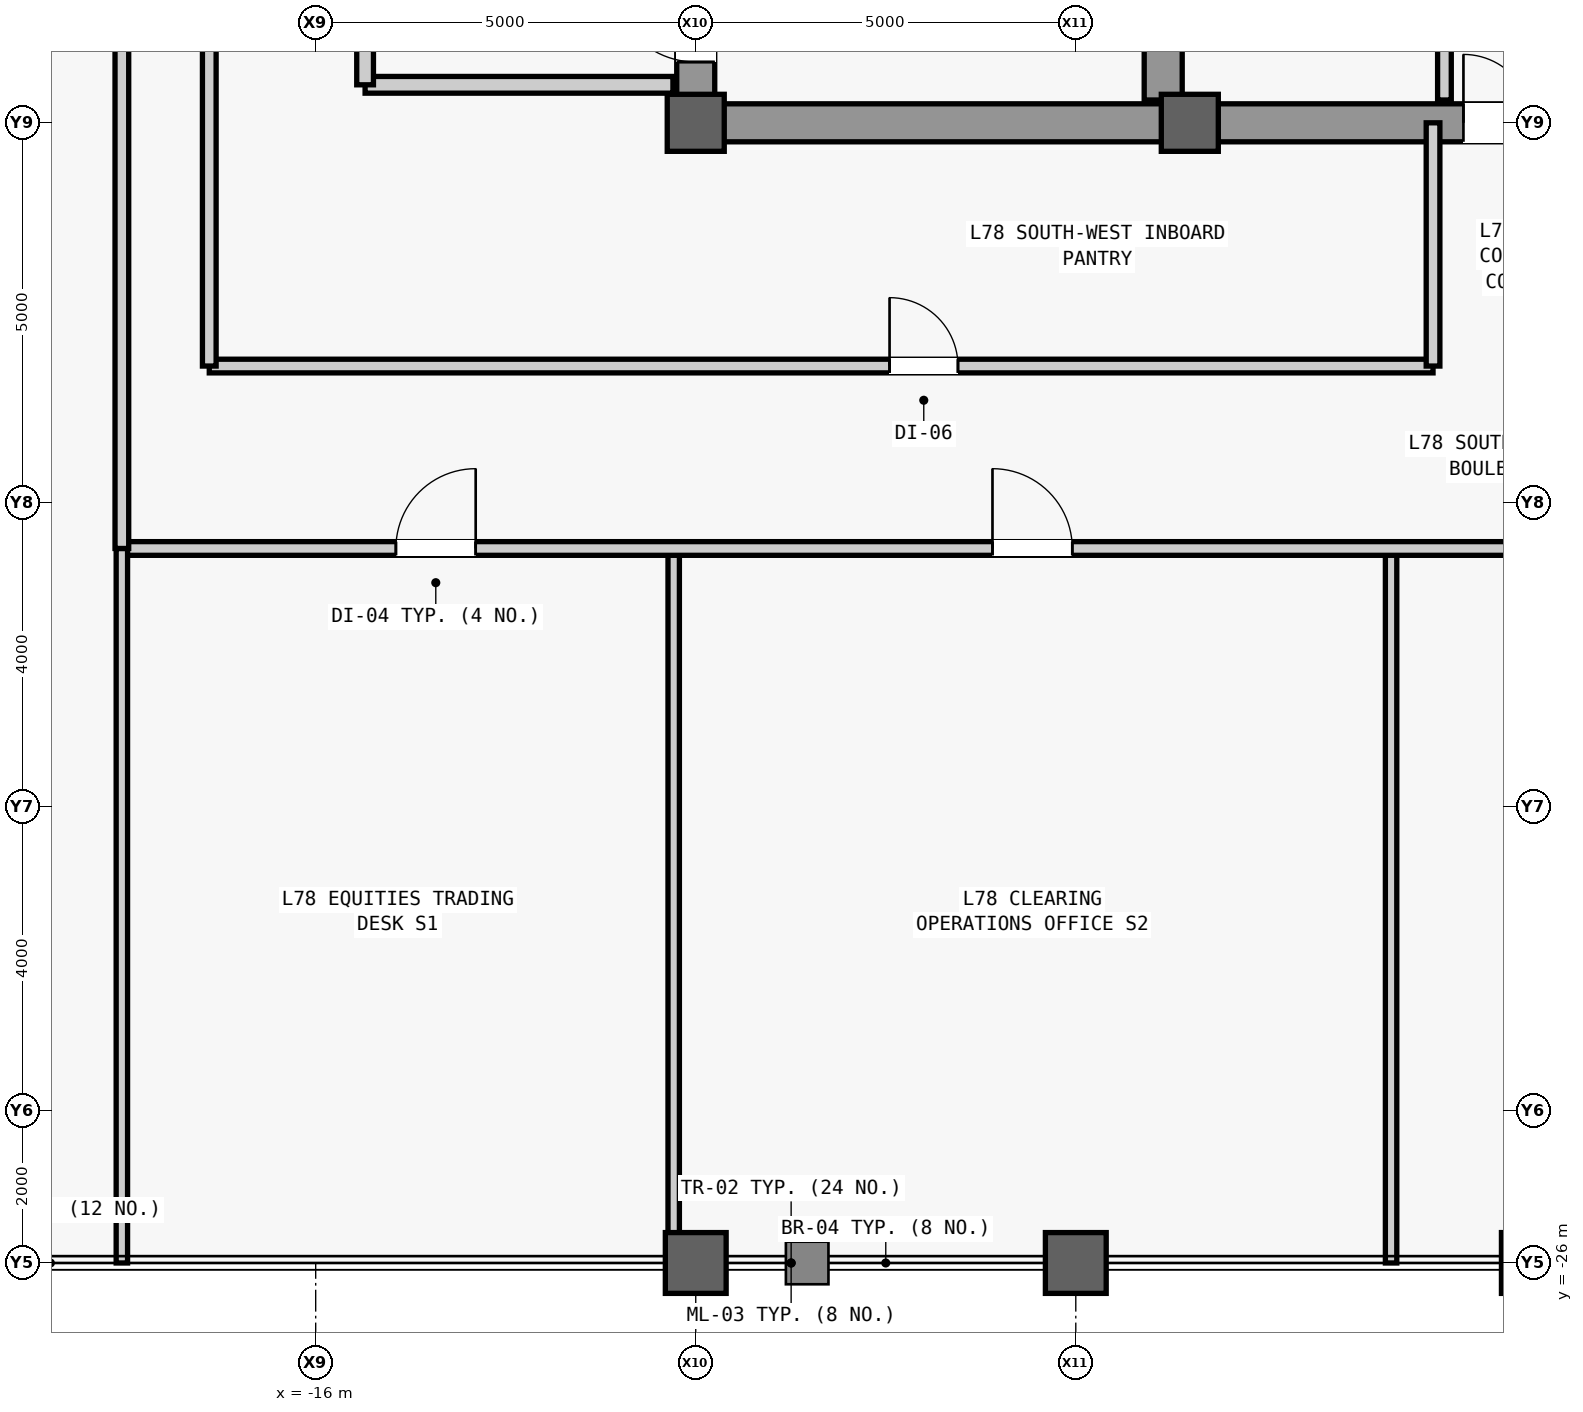
"""IFC4 building model, lengths in metres.
Left out: names, types, materials, properties, quantities, classifications, styles, units other than length and angle.
Written with IfcOpenShell. Run it as: python <this file> out.ifc"""

import sys

from ifc_helpers import new_model, si_unit, direction, frame, frame_2d, origin, origin_2d, place, context, subcontext, project, spatial, rectangle, hollow_rectangle, extrude, source, transform, mapped, element, fill, save


model = new_model("IFC4")
c1 = context("Model", 3, precision=1e-05, world=origin(), true_north=direction((0.0, 1.0)))
c2 = subcontext(c1, "Body", "Model", "MODEL_VIEW")
j1 = project(units=[si_unit("LENGTHUNIT", "METRE"), si_unit("PLANEANGLEUNIT", "RADIAN")], contexts=[c1])
p1 = place(None, origin())
s1 = spatial("IfcSite", under=j1, at=p1, CompositionType="ELEMENT")
p2 = place(p1, origin())
s2 = spatial("IfcBuilding", under=s1, at=p2, CompositionType="ELEMENT")
p3 = place(p2, frame((0.0, 0.0, 330.3)))
s3 = spatial("IfcBuildingStorey", under=s2, at=p3, CompositionType="ELEMENT", Elevation=330.3)
m1 = source(origin(), c2, "Body", "SweptSolid", [
    extrude(rectangle(XDim=22.0, YDim=0.5, at=frame_2d((11.0, 0.0))), origin(), (0.0, 0.0, 1.0), 3.74),
])
p4 = place(p3, frame((-11.0, -11.0, 0.0), z_axis=(0.0, 0.0, 1.0), x_axis=(0.0, 1.0, 0.0)))
e1 = element("IfcWall", 1, at=p4, inside=s3, PredefinedType="SHEAR", context=c2, shape_type="MappedRepresentation", body=[
    mapped(m1, transform((0.0, 0.0, 0.0), scale=1.0)),
])
m2 = source(origin(), c2, "Body", "SweptSolid", [
    extrude(rectangle(XDim=1.1, YDim=2.2, at=frame_2d((0.55, 1.1))), frame((0.0, 0.26, 0.0), z_axis=(0.0, -1.0, 0.0), x_axis=(1.0, 0.0, 0.0)), (0.0, 0.0, 1.0), 0.52),
])
p5 = place(p4, frame((0.8, 0.0, 0.0)))
e2 = element("IfcOpeningElement", 2, at=p5, cuts=e1, PredefinedType="OPENING", context=c2, shape_type="MappedRepresentation", body=[
    mapped(m2, transform((0.0, 0.0, 0.0), scale=1.0)),
])
p6 = place(p4, frame((12.5, 0.0, 0.0)))
e3 = element("IfcOpeningElement", 3, at=p6, cuts=e1, PredefinedType="OPENING", context=c2, shape_type="MappedRepresentation", body=[
    mapped(m2, transform((0.0, 0.0, 0.0), scale=1.0)),
])
m3 = source(origin(), c2, "Body", "SweptSolid", [
    extrude(rectangle(XDim=0.9, YDim=2.15, at=frame_2d((0.45, 1.075))), frame((0.0, 0.26, 0.0), z_axis=(0.0, -1.0, 0.0), x_axis=(1.0, 0.0, 0.0)), (0.0, 0.0, 1.0), 0.52),
])
p7 = place(p4, frame((6.85, 0.0, 0.0)))
e4 = element("IfcOpeningElement", 4, at=p7, cuts=e1, PredefinedType="OPENING", context=c2, shape_type="MappedRepresentation", body=[
    mapped(m3, transform((0.0, 0.0, 0.0), scale=1.0)),
])
m4 = source(origin(), c2, "Body", "SweptSolid", [
    extrude(rectangle(XDim=1.2, YDim=2.3, at=frame_2d((0.6, 1.15))), frame((0.0, 0.26, 0.0), z_axis=(0.0, -1.0, 0.0), x_axis=(1.0, 0.0, 0.0)), (0.0, 0.0, 1.0), 0.52),
])
p8 = place(p4, frame((14.6, 0.0, 0.0)))
e5 = element("IfcOpeningElement", 5, at=p8, cuts=e1, PredefinedType="OPENING", context=c2, shape_type="MappedRepresentation", body=[
    mapped(m4, transform((0.0, 0.0, 0.0), scale=1.0)),
])
p9 = place(p4, frame((18.2, 0.0, 0.0)))
e6 = element("IfcOpeningElement", 6, at=p9, cuts=e1, PredefinedType="OPENING", context=c2, shape_type="MappedRepresentation", body=[
    mapped(m4, transform((0.0, 0.0, 0.0), scale=1.0)),
])
m5 = source(origin(), c2, "Body", "SweptSolid", [
    extrude(rectangle(XDim=1.3, YDim=2.3, at=frame_2d((0.65, 1.15))), frame((0.0, 0.26, 0.0), z_axis=(0.0, -1.0, 0.0), x_axis=(1.0, 0.0, 0.0)), (0.0, 0.0, 1.0), 0.52),
])
p10 = place(p4, frame((2.7, 0.0, 0.0)))
e7 = element("IfcOpeningElement", 7, at=p10, cuts=e1, PredefinedType="OPENING", context=c2, shape_type="MappedRepresentation", body=[
    mapped(m5, transform((0.0, 0.0, 0.0), scale=1.0)),
])
m6 = source(origin(), c2, "Body", "SweptSolid", [
    extrude(rectangle(XDim=21.4, YDim=0.5, at=frame_2d((10.7, 0.0))), origin(), (0.0, 0.0, 1.0), 3.74),
])
p11 = place(p3, frame((-4.85, -10.7, 0.0), z_axis=(0.0, 0.0, 1.0), x_axis=(0.0, 1.0, 0.0)))
e8 = element("IfcWall", 8, at=p11, inside=s3, PredefinedType="SHEAR", context=c2, shape_type="MappedRepresentation", body=[
    mapped(m6, transform((0.0, 0.0, 0.0), scale=1.0)),
])
m7 = source(origin(), c2, "Body", "SweptSolid", [
    extrude(rectangle(XDim=5.9, YDim=0.5, at=frame_2d((2.95, 0.0))), origin(), (0.0, 0.0, 1.0), 3.74),
])
p12 = place(p3, frame((-10.75, -11.0, 0.0), z_axis=(0.0, 0.0, 1.0), x_axis=(1.0, 0.0, 0.0)))
e9 = element("IfcWall", 9, at=p12, inside=s3, PredefinedType="SHEAR", context=c2, shape_type="MappedRepresentation", body=[
    mapped(m7, transform((0.0, 0.0, 0.0), scale=1.0)),
])
m8 = source(origin(), c2, "Body", "SweptSolid", [
    extrude(rectangle(XDim=9.2, YDim=0.5, at=frame_2d((4.6, 0.0))), origin(), (0.0, 0.0, 1.0), 3.74),
])
p13 = place(p3, frame((-4.6, -11.0, 0.0), z_axis=(0.0, 0.0, 1.0), x_axis=(1.0, 0.0, 0.0)))
e10 = element("IfcWall", 10, at=p13, inside=s3, PredefinedType="SHEAR", context=c2, shape_type="MappedRepresentation", body=[
    mapped(m8, transform((0.0, 0.0, 0.0), scale=1.0)),
])
m9 = source(origin(), c2, "Body", "SweptSolid", [
    extrude(rectangle(XDim=1.8, YDim=2.25, at=frame_2d((0.9, 1.125))), frame((0.0, 0.26, 0.0), z_axis=(0.0, -1.0, 0.0), x_axis=(1.0, 0.0, 0.0)), (0.0, 0.0, 1.0), 0.52),
])
p14 = place(p13, frame((3.7, 0.0, 0.0)))
e11 = element("IfcOpeningElement", 11, at=p14, cuts=e10, PredefinedType="OPENING", context=c2, shape_type="MappedRepresentation", body=[
    mapped(m9, transform((0.0, 0.0, 0.0), scale=1.0)),
])
m10 = source(origin(), c2, "Body", "SweptSolid", [
    extrude(hollow_rectangle(XDim=0.8, YDim=0.8, WallThickness=0.045, at=origin_2d()), origin(), (0.0, 0.0, 1.0), 4.0),
])
p15 = place(p3, frame((-11.0, -26.0, 0.0), z_axis=(0.0, 0.0, 1.0), x_axis=(1.0, 0.0, 0.0)))
e12 = element("IfcColumn", 12, at=p15, inside=s3, PredefinedType="COLUMN", context=c2, shape_type="MappedRepresentation", body=[
    mapped(m10, transform((0.0, 0.0, 0.0), scale=1.0)),
])
m11 = source(origin(), c2, "Body", "SweptSolid", [
    extrude(rectangle(XDim=0.75, YDim=0.75, at=origin_2d()), origin(), (0.0, 0.0, 1.0), 4.0),
])
p16 = place(p3, frame((-11.0, -11.0, 0.0), z_axis=(0.0, 0.0, 1.0), x_axis=(1.0, 0.0, 0.0)))
e13 = element("IfcColumn", 13, at=p16, inside=s3, PredefinedType="COLUMN", context=c2, shape_type="MappedRepresentation", body=[
    mapped(m11, transform((0.0, 0.0, 0.0), scale=1.0)),
])
p17 = place(p3, frame((-6.0, -26.0, 0.0), z_axis=(0.0, 0.0, 1.0), x_axis=(1.0, 0.0, 0.0)))
e14 = element("IfcColumn", 14, at=p17, inside=s3, PredefinedType="COLUMN", context=c2, shape_type="MappedRepresentation", body=[
    mapped(m10, transform((0.0, 0.0, 0.0), scale=1.0)),
])
p18 = place(p3, frame((-4.5, -11.0, 0.0), z_axis=(0.0, 0.0, 1.0), x_axis=(1.0, 0.0, 0.0)))
e15 = element("IfcColumn", 15, at=p18, inside=s3, PredefinedType="COLUMN", context=c2, shape_type="MappedRepresentation", body=[
    mapped(m11, transform((0.0, 0.0, 0.0), scale=1.0)),
])
p19 = place(p3, frame((0.0, -26.0, 0.0), z_axis=(0.0, 0.0, 1.0), x_axis=(1.0, 0.0, 0.0)))
e16 = element("IfcColumn", 16, at=p19, inside=s3, PredefinedType="COLUMN", context=c2, shape_type="MappedRepresentation", body=[
    mapped(m10, transform((0.0, 0.0, 0.0), scale=1.0)),
])
m12 = source(origin(), c2, "Body", "SweptSolid", [
    extrude(rectangle(XDim=4.05, YDim=0.22, at=frame_2d((2.025, 0.0))), origin(), (0.0, 0.0, 1.0), 3.74),
])
p20 = place(p3, frame((-15.35, -10.5, 0.0), z_axis=(0.0, 0.0, 1.0), x_axis=(1.0, 0.0, 0.0)))
e17 = element("IfcWall", 17, at=p20, inside=s3, PredefinedType="PARTITIONING", context=c2, shape_type="MappedRepresentation", body=[
    mapped(m12, transform((0.0, 0.0, 0.0), scale=1.0)),
])
m13 = source(origin(), c2, "Body", "SweptSolid", [
    extrude(rectangle(XDim=4.4, YDim=0.22, at=frame_2d((2.2, 0.0))), origin(), (0.0, 0.0, 1.0), 3.74),
])
p21 = place(p3, frame((-15.35, -10.5, 0.0), z_axis=(0.0, 0.0, 1.0), x_axis=(0.0, 1.0, 0.0)))
e18 = element("IfcWall", 18, at=p21, inside=s3, PredefinedType="PARTITIONING", context=c2, shape_type="MappedRepresentation", body=[
    mapped(m13, transform((0.0, 0.0, 0.0), scale=1.0)),
])
m14 = source(origin(), c2, "Body", "SweptSolid", [
    extrude(rectangle(XDim=1.2, YDim=2.2, at=frame_2d((0.6, 1.1))), frame((0.0, 0.12, 0.0), z_axis=(0.0, -1.0, 0.0), x_axis=(1.0, 0.0, 0.0)), (0.0, 0.0, 1.0), 0.24),
])
p22 = place(p21, frame((1.6, 0.0, 0.0)))
e19 = element("IfcOpeningElement", 19, at=p22, cuts=e18, PredefinedType="OPENING", context=c2, shape_type="MappedRepresentation", body=[
    mapped(m14, transform((0.0, 0.0, 0.0), scale=1.0)),
])
m15 = source(origin(), c2, "Body", "SweptSolid", [
    extrude(rectangle(XDim=5.4, YDim=0.18, at=frame_2d((2.7, 0.0))), origin(), (0.0, 0.0, 1.0), 3.74),
])
p23 = place(p3, frame((-1.15, -10.7, 0.0), z_axis=(0.0, 0.0, 1.0), x_axis=(0.0, 1.0, 0.0)))
e20 = element("IfcWall", 20, at=p23, inside=s3, PredefinedType="PARTITIONING", context=c2, shape_type="MappedRepresentation", body=[
    mapped(m15, transform((0.0, 0.0, 0.0), scale=1.0)),
])
m16 = source(origin(), c2, "Body", "SweptSolid", [
    extrude(rectangle(XDim=0.9, YDim=2.15, at=frame_2d((0.45, 1.075))), frame((0.0, 0.1, 0.0), z_axis=(0.0, -1.0, 0.0), x_axis=(1.0, 0.0, 0.0)), (0.0, 0.0, 1.0), 0.2),
])
p24 = place(p23, frame((0.9, 0.0, 0.0)))
e21 = element("IfcOpeningElement", 21, at=p24, cuts=e20, PredefinedType="OPENING", context=c2, shape_type="MappedRepresentation", body=[
    mapped(m16, transform((0.0, 0.0, 0.0), scale=1.0)),
])
p25 = place(p23, frame((3.6, 0.0, 0.0)))
e22 = element("IfcOpeningElement", 22, at=p25, cuts=e20, PredefinedType="OPENING", context=c2, shape_type="MappedRepresentation", body=[
    mapped(m16, transform((0.0, 0.0, 0.0), scale=1.0)),
])
m17 = source(origin(), c2, "Body", "SweptSolid", [
    extrude(rectangle(XDim=16.1, YDim=0.18, at=frame_2d((8.05, 0.0))), origin(), (0.0, 0.0, 1.0), 3.74),
])
p26 = place(p3, frame((-17.4, -14.2, 0.0), z_axis=(0.0, 0.0, 1.0), x_axis=(1.0, 0.0, 0.0)))
e23 = element("IfcWall", 23, at=p26, inside=s3, PredefinedType="PARTITIONING", context=c2, shape_type="MappedRepresentation", body=[
    mapped(m17, transform((0.0, 0.0, 0.0), scale=1.0)),
])
p27 = place(p26, frame((8.95, 0.0, 0.0)))
e24 = element("IfcOpeningElement", 24, at=p27, cuts=e23, PredefinedType="OPENING", context=c2, shape_type="MappedRepresentation", body=[
    mapped(m16, transform((0.0, 0.0, 0.0), scale=1.0)),
])
m18 = source(origin(), c2, "Body", "SweptSolid", [
    extrude(rectangle(XDim=4.4, YDim=0.18, at=frame_2d((2.2, 0.0))), origin(), (0.0, 0.0, 1.0), 3.74),
])
p28 = place(p3, frame((-17.4, -14.2, 0.0), z_axis=(0.0, 0.0, 1.0), x_axis=(0.0, 1.0, 0.0)))
e25 = element("IfcWall", 25, at=p28, inside=s3, PredefinedType="PARTITIONING", context=c2, shape_type="MappedRepresentation", body=[
    mapped(m18, transform((0.0, 0.0, 0.0), scale=1.0)),
])
m19 = source(origin(), c2, "Body", "SweptSolid", [
    extrude(rectangle(XDim=3.2, YDim=0.18, at=frame_2d((1.6, 0.0))), origin(), (0.0, 0.0, 1.0), 3.74),
])
p29 = place(p3, frame((-1.3, -14.2, 0.0), z_axis=(0.0, 0.0, 1.0), x_axis=(0.0, 1.0, 0.0)))
e26 = element("IfcWall", 26, at=p29, inside=s3, PredefinedType="PARTITIONING", context=c2, shape_type="MappedRepresentation", body=[
    mapped(m19, transform((0.0, 0.0, 0.0), scale=1.0)),
])
m20 = source(origin(), c2, "Body", "SweptSolid", [
    extrude(rectangle(XDim=9.4, YDim=0.15, at=frame_2d((4.7, 0.0))), origin(), (0.0, 0.0, 1.0), 3.124),
])
p30 = place(p3, frame((-11.29, -26.0, 0.0), z_axis=(0.0, 0.0, 1.0), x_axis=(0.0, 1.0, 0.0)))
e27 = element("IfcWall", 27, at=p30, inside=s3, PredefinedType="PARTITIONING", context=c2, shape_type="MappedRepresentation", body=[
    mapped(m20, transform((0.0, 0.0, 0.0), scale=1.0)),
])
m21 = source(origin(), c2, "Body", "SweptSolid", [
    extrude(rectangle(XDim=9.4, YDim=0.15, at=frame_2d((4.7, 0.0))), origin(), (0.0, 0.0, 1.0), 3.74),
])
p31 = place(p3, frame((-1.852, -26.0, 0.0), z_axis=(0.0, 0.0, 1.0), x_axis=(0.0, 1.0, 0.0)))
e28 = element("IfcWall", 28, at=p31, inside=s3, PredefinedType="PARTITIONING", context=c2, shape_type="MappedRepresentation", body=[
    mapped(m21, transform((0.0, 0.0, 0.0), scale=1.0)),
])
m22 = source(origin(), c2, "Body", "SweptSolid", [
    extrude(rectangle(XDim=36.3, YDim=0.18, at=frame_2d((18.15, 0.0))), origin(), (0.0, 0.0, 1.0), 3.74),
])
p32 = place(p3, frame((-18.55, -16.6, 0.0), z_axis=(0.0, 0.0, 1.0), x_axis=(1.0, 0.0, 0.0)))
e29 = element("IfcWall", 29, at=p32, inside=s3, PredefinedType="PARTITIONING", context=c2, shape_type="MappedRepresentation", body=[
    mapped(m22, transform((0.0, 0.0, 0.0), scale=1.0)),
])
m23 = source(origin(), c2, "Body", "SweptSolid", [
    extrude(rectangle(XDim=1.05, YDim=2.2, at=frame_2d((0.525, 1.1))), frame((0.0, 0.1, 0.0), z_axis=(0.0, -1.0, 0.0), x_axis=(1.0, 0.0, 0.0)), (0.0, 0.0, 1.0), 0.2),
])
p33 = place(p32, frame((3.605, 0.0, 0.0)))
e30 = element("IfcOpeningElement", 30, at=p33, cuts=e29, PredefinedType="OPENING", context=c2, shape_type="MappedRepresentation", body=[
    mapped(m23, transform((0.0, 0.0, 0.0), scale=1.0)),
])
p34 = place(p32, frame((11.454, 0.0, 0.0)))
e31 = element("IfcOpeningElement", 31, at=p34, cuts=e29, PredefinedType="OPENING", context=c2, shape_type="MappedRepresentation", body=[
    mapped(m23, transform((0.0, 0.0, 0.0), scale=1.0)),
])
p35 = place(p32, frame((21.255, 0.0, 0.0)))
e32 = element("IfcOpeningElement", 32, at=p35, cuts=e29, PredefinedType="OPENING", context=c2, shape_type="MappedRepresentation", body=[
    mapped(m23, transform((0.0, 0.0, 0.0), scale=1.0)),
])
p36 = place(p32, frame((30.531, 0.0, 0.0)))
e33 = element("IfcOpeningElement", 33, at=p36, cuts=e29, PredefinedType="OPENING", context=c2, shape_type="MappedRepresentation", body=[
    mapped(m23, transform((0.0, 0.0, 0.0), scale=1.0)),
])
p37 = place(p3, frame((-18.55, -26.0, 0.0), z_axis=(0.0, 0.0, 1.0), x_axis=(0.0, 1.0, 0.0)))
e34 = element("IfcWall", 34, at=p37, inside=s3, PredefinedType="PARTITIONING", context=c2, shape_type="MappedRepresentation", body=[
    mapped(m21, transform((0.0, 0.0, 0.0), scale=1.0)),
])
m24 = source(origin(), c2, "Body", "SweptSolid", [
    extrude(rectangle(XDim=36.6, YDim=0.18, at=frame_2d((18.3, 0.0))), origin(), (0.0, 0.0, 1.0), 3.74),
])
p38 = place(p3, frame((-18.55, -16.6, 0.0), z_axis=(0.0, 0.0, 1.0), x_axis=(0.0, 1.0, 0.0)))
e35 = element("IfcWall", 35, at=p38, inside=s3, PredefinedType="PARTITIONING", context=c2, shape_type="MappedRepresentation", body=[
    mapped(m24, transform((0.0, 0.0, 0.0), scale=1.0)),
])
m25 = source(origin(), c2, "Body", "SweptSolid", [
    extrude(rectangle(XDim=0.95, YDim=2.15, at=frame_2d((0.475, 1.075))), frame((0.0, 0.1, 0.0), z_axis=(0.0, -1.0, 0.0), x_axis=(1.0, 0.0, 0.0)), (0.0, 0.0, 1.0), 0.2),
])
p39 = place(p38, frame((16.825, 0.0, 0.0)))
e36 = element("IfcOpeningElement", 36, at=p39, cuts=e35, PredefinedType="OPENING", context=c2, shape_type="MappedRepresentation", body=[
    mapped(m25, transform((0.0, 0.0, 0.0), scale=1.0)),
])
m26 = source(origin(), c2, "Body", "SweptSolid", [
    extrude(rectangle(XDim=1.1, YDim=2.2, at=frame_2d((0.55, 1.1))), frame((0.0, 0.025, 0.0), z_axis=(0.0, -1.0, 0.0), x_axis=(1.0, 0.0, 0.0)), (0.0, 0.0, 1.0), 0.05),
])
p40 = place(p5, origin())
e37 = element("IfcDoor", 37, at=p40, inside=s3, OperationType="SINGLE_SWING_RIGHT", PredefinedType="DOOR", context=c2, shape_type="MappedRepresentation", body=[
    mapped(m26, transform((0.0, 0.0, 0.0), scale=1.0)),
])
fill(e2, e37)
m27 = source(origin(), c2, "Body", "SweptSolid", [
    extrude(rectangle(XDim=1.8, YDim=2.25, at=frame_2d((0.9, 1.125))), frame((0.0, 0.025, 0.0), z_axis=(0.0, -1.0, 0.0), x_axis=(1.0, 0.0, 0.0)), (0.0, 0.0, 1.0), 0.05),
])
p41 = place(p14, origin())
e38 = element("IfcDoor", 38, at=p41, inside=s3, OperationType="SINGLE_SWING_LEFT", PredefinedType="DOOR", context=c2, shape_type="MappedRepresentation", body=[
    mapped(m27, transform((0.0, 0.0, 0.0), scale=1.0)),
])
fill(e11, e38)
m28 = source(origin(), c2, "Body", "SweptSolid", [
    extrude(rectangle(XDim=0.9, YDim=2.15, at=frame_2d((0.45, 1.075))), frame((0.0, 0.025, 0.0), z_axis=(0.0, -1.0, 0.0), x_axis=(1.0, 0.0, 0.0)), (0.0, 0.0, 1.0), 0.05),
])
p42 = place(p27, origin())
e39 = element("IfcDoor", 39, at=p42, inside=s3, OperationType="SINGLE_SWING_LEFT", PredefinedType="DOOR", context=c2, shape_type="MappedRepresentation", body=[
    mapped(m28, transform((0.0, 0.0, 0.0), scale=1.0)),
])
fill(e24, e39)
m29 = source(origin(), c2, "Body", "SweptSolid", [
    extrude(rectangle(XDim=1.05, YDim=2.2, at=frame_2d((0.525, 1.1))), frame((0.0, 0.025, 0.0), z_axis=(0.0, -1.0, 0.0), x_axis=(1.0, 0.0, 0.0)), (0.0, 0.0, 1.0), 0.05),
])
p43 = place(p33, origin())
e40 = element("IfcDoor", 40, at=p43, inside=s3, OperationType="SINGLE_SWING_RIGHT", PredefinedType="DOOR", context=c2, shape_type="MappedRepresentation", body=[
    mapped(m29, transform((0.0, 0.0, 0.0), scale=1.0)),
])
fill(e30, e40)
p44 = place(p34, origin())
e41 = element("IfcDoor", 41, at=p44, inside=s3, OperationType="SINGLE_SWING_LEFT", PredefinedType="DOOR", context=c2, shape_type="MappedRepresentation", body=[
    mapped(m29, transform((0.0, 0.0, 0.0), scale=1.0)),
])
fill(e31, e41)
save(model, sys.argv[1])
